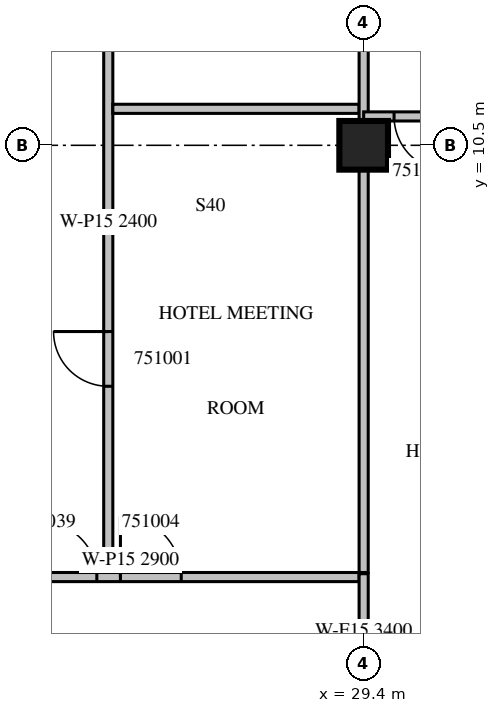
"""IFC4 building model, lengths in metres.
Left out: names, types, materials, properties, quantities, classifications, styles, units other than length and angle.
Written with IfcOpenShell. Run it as: python <this file> out.ifc"""

import sys

from ifc_helpers import new_model, si_unit, direction, frame, frame_2d, origin, origin_2d, place, context, subcontext, project, spatial, rectangle, extrude, source, transform, mapped, element, fill, save


model = new_model("IFC4")
c1 = context("Model", 3, precision=1e-05, world=origin(), true_north=direction((0.0, 1.0)))
c2 = subcontext(c1, "Body", "Model", "MODEL_VIEW")
j1 = project(units=[si_unit("LENGTHUNIT", "METRE"), si_unit("PLANEANGLEUNIT", "RADIAN")], contexts=[c1])
p1 = place(None, origin())
s1 = spatial("IfcSite", under=j1, at=p1, CompositionType="ELEMENT")
p2 = place(p1, origin())
s2 = spatial("IfcBuilding", under=s1, at=p2, CompositionType="ELEMENT")
p3 = place(p2, frame((0.0, 0.0, 227.2)))
s3 = spatial("IfcBuildingStorey", under=s2, at=p3, CompositionType="ELEMENT", Elevation=227.2)
m1 = source(origin(), c2, "Body", "SweptSolid", [
    extrude(rectangle(XDim=0.8, YDim=0.8, at=origin_2d()), origin(), (0.0, 0.0, 1.0), 3.8),
])
p4 = place(p3, frame((29.4, 10.5, 0.0), z_axis=(0.0, 0.0, 1.0), x_axis=(1.0, 0.0, 0.0)))
e1 = element("IfcColumn", 1, at=p4, inside=s3, PredefinedType="COLUMN", context=c2, shape_type="MappedRepresentation", body=[
    mapped(m1, transform((0.0, 0.0, 0.0), scale=1.0)),
])
m2 = source(origin(), c2, "Body", "SweptSolid", [
    extrude(rectangle(XDim=11.525, YDim=0.15, at=frame_2d((5.763, 0.0))), origin(), (0.0, 0.0, 1.0), 2.4),
])
p5 = place(p3, frame((25.2, 15.0, 0.0), z_axis=(0.0, 0.0, 1.0), x_axis=(0.0, -1.0, 0.0)))
e2 = element("IfcWall", 2, at=p5, inside=s3, PredefinedType="PARTITIONING", context=c2, shape_type="MappedRepresentation", body=[
    mapped(m2, transform((0.0, 0.0, 0.0), scale=1.0)),
])
m3 = source(origin(), c2, "Body", "SweptSolid", [
    extrude(rectangle(XDim=0.9, YDim=2.1, at=frame_2d((0.45, 1.05))), frame((0.0, 0.085, 0.0), z_axis=(0.0, -1.0, 0.0), x_axis=(1.0, 0.0, 0.0)), (0.0, 0.0, 1.0), 0.17),
])
p6 = place(p5, frame((7.562, 0.0, 0.0)))
e3 = element("IfcOpeningElement", 3, at=p6, cuts=e2, PredefinedType="OPENING", context=c2, shape_type="MappedRepresentation", body=[
    mapped(m3, transform((0.0, 0.0, 0.0), scale=1.0)),
])
p7 = place(p5, frame((0.925, 0.0, 0.0)))
e4 = element("IfcOpeningElement", 4, at=p7, cuts=e2, PredefinedType="OPENING", context=c2, shape_type="MappedRepresentation", body=[
    mapped(m3, transform((0.0, 0.0, 0.0), scale=1.0)),
])
m4 = source(origin(), c2, "Body", "SweptSolid", [
    extrude(rectangle(XDim=4.05, YDim=0.15, at=frame_2d((2.025, 0.0))), origin(), (0.0, 0.0, 1.0), 3.4),
])
p8 = place(p3, frame((29.325, 11.1, 0.0), z_axis=(0.0, 0.0, 1.0), x_axis=(-1.0, 0.0, 0.0)))
e5 = element("IfcWall", 5, at=p8, inside=s3, PredefinedType="PARTITIONING", context=c2, shape_type="MappedRepresentation", body=[
    mapped(m4, transform((0.0, 0.0, 0.0), scale=1.0)),
])
p9 = place(p3, frame((29.4, 3.475, 0.0), z_axis=(0.0, 0.0, 1.0), x_axis=(0.0, 1.0, 0.0)))
e6 = element("IfcWall", 6, at=p9, inside=s3, PredefinedType="PARTITIONING", context=c2, shape_type="SweptSolid", body=[
    extrude(rectangle(XDim=6.626, YDim=0.15, at=frame_2d((3.313, 0.0))), origin(), (0.0, 0.0, 1.0), 3.4),
])
p10 = place(p3, frame((29.4, 10.899, 0.0), z_axis=(0.0, 0.0, 1.0), x_axis=(0.0, 1.0, 0.0)))
e7 = element("IfcWall", 7, at=p10, inside=s3, PredefinedType="PARTITIONING", context=c2, shape_type="SweptSolid", body=[
    extrude(rectangle(XDim=4.101, YDim=0.15, at=frame_2d((2.05, 0.0))), origin(), (0.0, 0.0, 1.0), 3.4),
])
m5 = source(origin(), c2, "Body", "SweptSolid", [
    extrude(rectangle(XDim=7.525, YDim=0.15, at=frame_2d((3.763, 0.0))), origin(), (0.0, 0.0, 1.0), 2.9),
])
p11 = place(p3, frame((21.8, 3.4, 0.0), z_axis=(0.0, 0.0, 1.0), x_axis=(1.0, 0.0, 0.0)))
e8 = element("IfcWall", 8, at=p11, inside=s3, PredefinedType="PARTITIONING", context=c2, shape_type="MappedRepresentation", body=[
    mapped(m5, transform((0.0, 0.0, 0.0), scale=1.0)),
])
m6 = source(origin(), c2, "Body", "SweptSolid", [
    extrude(rectangle(XDim=1.0, YDim=2.1, at=frame_2d((0.5, 1.05))), frame((0.0, 0.085, 0.0), z_axis=(0.0, -1.0, 0.0), x_axis=(1.0, 0.0, 0.0)), (0.0, 0.0, 1.0), 0.17),
])
p12 = place(p11, frame((3.6, 0.0, 0.0)))
e9 = element("IfcOpeningElement", 9, at=p12, cuts=e8, PredefinedType="OPENING", context=c2, shape_type="MappedRepresentation", body=[
    mapped(m6, transform((0.0, 0.0, 0.0), scale=1.0)),
])
p13 = place(p11, frame((2.312, 0.0, 0.0)))
e10 = element("IfcOpeningElement", 10, at=p13, cuts=e8, PredefinedType="OPENING", context=c2, shape_type="MappedRepresentation", body=[
    mapped(m3, transform((0.0, 0.0, 0.0), scale=1.0)),
])
p14 = place(p3, frame((29.4, 0.799, 0.0), z_axis=(0.0, 0.0, 1.0), x_axis=(0.0, 1.0, 0.0)))
e11 = element("IfcWall", 11, at=p14, inside=s3, PredefinedType="PARTITIONING", context=c2, shape_type="SweptSolid", body=[
    extrude(rectangle(XDim=2.656, YDim=0.15, at=frame_2d((1.328, 0.0))), origin(), (0.0, 0.0, 1.0), 3.4),
])
m7 = source(origin(), c2, "Body", "SweptSolid", [
    extrude(rectangle(XDim=8.4, YDim=0.15, at=frame_2d((4.2, 0.0))), origin(), (0.0, 0.0, 1.0), 2.9),
])
p15 = place(p3, frame((37.8, 10.975, 0.0), z_axis=(0.0, 0.0, 1.0), x_axis=(-1.0, 0.0, 0.0)))
e12 = element("IfcWall", 12, at=p15, inside=s3, PredefinedType="PARTITIONING", context=c2, shape_type="MappedRepresentation", body=[
    mapped(m7, transform((0.0, 0.0, 0.0), scale=1.0)),
])
p16 = place(p15, frame((7.0, 0.0, 0.0)))
e13 = element("IfcOpeningElement", 13, at=p16, cuts=e12, PredefinedType="OPENING", context=c2, shape_type="MappedRepresentation", body=[
    mapped(m3, transform((0.0, 0.0, 0.0), scale=1.0)),
])
p17 = place(p15, frame((5.013, 0.0, 0.0)))
e14 = element("IfcOpeningElement", 14, at=p17, cuts=e12, PredefinedType="OPENING", context=c2, shape_type="MappedRepresentation", body=[
    mapped(m3, transform((0.0, 0.0, 0.0), scale=1.0)),
])
p18 = place(p15, frame((2.388, 0.0, 0.0)))
e15 = element("IfcOpeningElement", 15, at=p18, cuts=e12, PredefinedType="OPENING", context=c2, shape_type="MappedRepresentation", body=[
    mapped(m3, transform((0.0, 0.0, 0.0), scale=1.0)),
])
p19 = place(p15, frame((0.46, 0.0, 0.0)))
e16 = element("IfcOpeningElement", 16, at=p19, cuts=e12, PredefinedType="OPENING", context=c2, shape_type="MappedRepresentation", body=[
    mapped(m3, transform((0.0, 0.0, 0.0), scale=1.0)),
])
m8 = source(origin(), c2, "Body", "SweptSolid", [
    extrude(rectangle(XDim=0.9, YDim=2.1, at=frame_2d((0.45, 1.05))), frame((0.0, 0.025, 0.0), z_axis=(0.0, -1.0, 0.0), x_axis=(1.0, 0.0, 0.0)), (0.0, 0.0, 1.0), 0.05),
])
p20 = place(p6, origin())
e17 = element("IfcDoor", 17, at=p20, inside=s3, OperationType="SINGLE_SWING_RIGHT", PredefinedType="DOOR", context=c2, shape_type="MappedRepresentation", body=[
    mapped(m8, transform((0.0, 0.0, 0.0), scale=1.0)),
])
fill(e3, e17)
m9 = source(origin(), c2, "Body", "SweptSolid", [
    extrude(rectangle(XDim=1.0, YDim=2.1, at=frame_2d((0.5, 1.05))), frame((0.0, 0.025, 0.0), z_axis=(0.0, -1.0, 0.0), x_axis=(1.0, 0.0, 0.0)), (0.0, 0.0, 1.0), 0.05),
])
p21 = place(p12, origin())
e18 = element("IfcDoor", 18, at=p21, inside=s3, OperationType="SINGLE_SWING_LEFT", PredefinedType="DOOR", context=c2, shape_type="MappedRepresentation", body=[
    mapped(m9, transform((0.0, 0.0, 0.0), scale=1.0)),
])
fill(e9, e18)
p22 = place(p16, origin())
e19 = element("IfcDoor", 19, at=p22, inside=s3, OperationType="SINGLE_SWING_LEFT", PredefinedType="DOOR", context=c2, shape_type="MappedRepresentation", body=[
    mapped(m8, transform((0.0, 0.0, 0.0), scale=1.0)),
])
fill(e13, e19)
p23 = place(p13, origin())
e20 = element("IfcDoor", 20, at=p23, inside=s3, OperationType="SINGLE_SWING_LEFT", PredefinedType="DOOR", context=c2, shape_type="MappedRepresentation", body=[
    mapped(m8, transform((0.0, 0.0, 0.0), scale=1.0)),
])
fill(e10, e20)
save(model, sys.argv[1])
